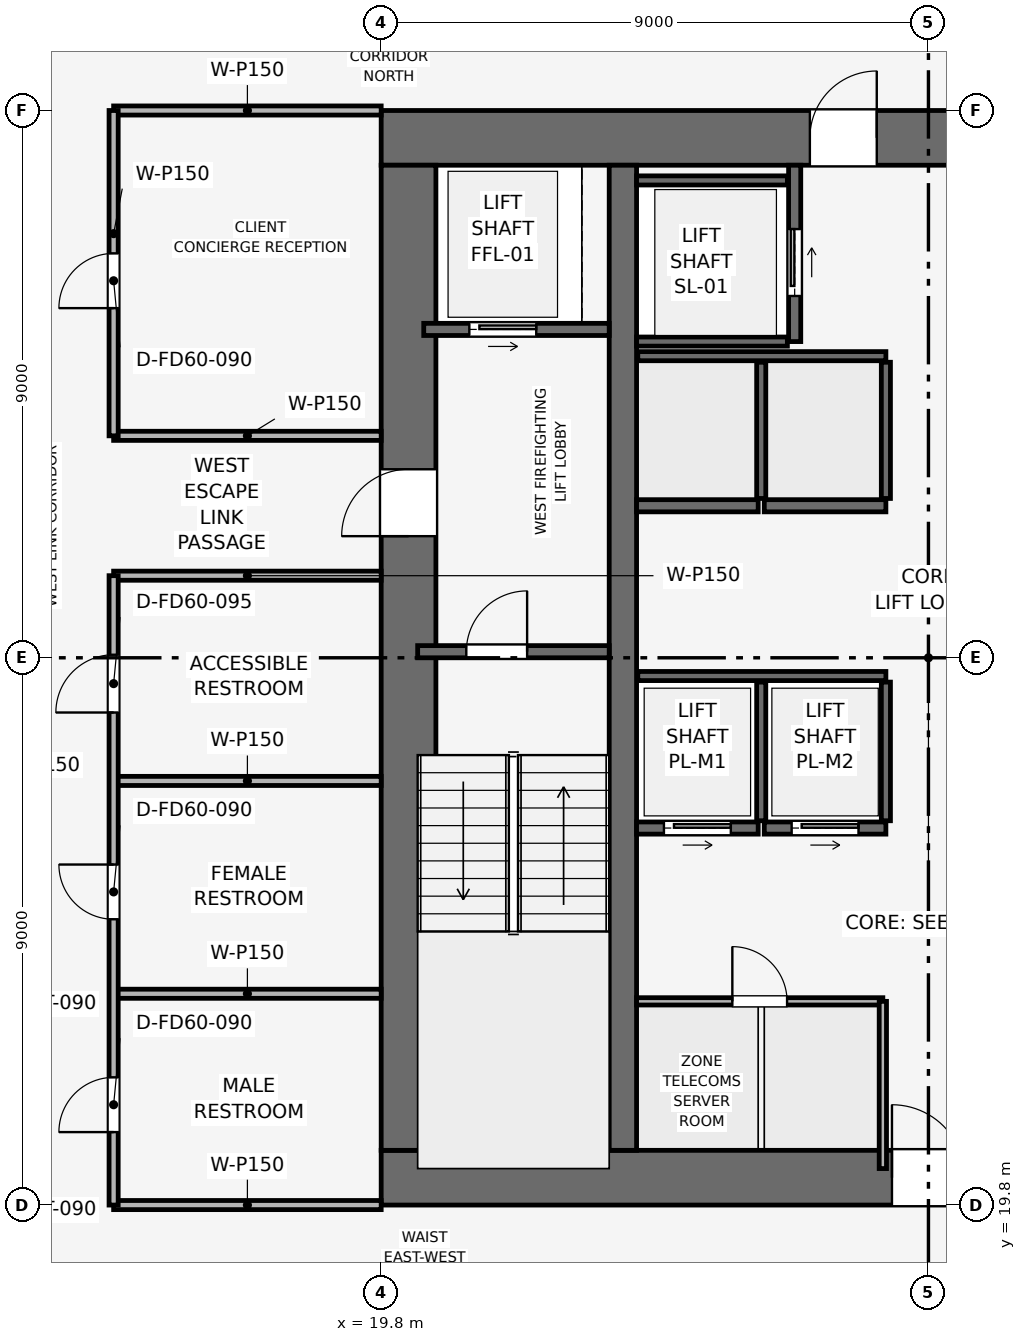
"""IFC4 building model, lengths in metres.
Left out: names, types, materials, properties, quantities, classifications, styles, units other than length and angle.
Written with IfcOpenShell. Run it as: python <this file> out.ifc"""

import sys

from ifc_helpers import new_model, si_unit, direction, frame, frame_2d, origin, place, context, subcontext, project, spatial, rectangle, extrude, element, fill, save


model = new_model("IFC4")
c1 = context("Model", 3, precision=1e-05, world=origin(), true_north=direction((0.0, 1.0)))
c2 = subcontext(c1, "Body", "Model", "MODEL_VIEW")
j1 = project(units=[si_unit("LENGTHUNIT", "METRE"), si_unit("PLANEANGLEUNIT", "RADIAN")], contexts=[c1])
p1 = place(None, origin())
s1 = spatial("IfcSite", under=j1, at=p1, CompositionType="ELEMENT")
p2 = place(p1, origin())
s2 = spatial("IfcBuilding", under=s1, at=p2, CompositionType="ELEMENT")
p3 = place(p2, frame((0.0, 0.0, 172.05)))
s3 = spatial("IfcBuildingStorey", under=s2, at=p3, CompositionType="ELEMENT", Elevation=172.05)
p4 = place(p3, frame((19.8, 20.25, 0.0), z_axis=(0.0, 0.0, 1.0), x_axis=(1.0, 0.0, 0.0)))
e1 = element("IfcWall", 1, at=p4, inside=s3, PredefinedType="SHEAR", context=c2, shape_type="SweptSolid", body=[
    extrude(rectangle(XDim=18.0, YDim=0.9, at=frame_2d((9.0, 0.0))), origin(), (0.0, 0.0, 1.0), 3.75),
])
p5 = place(p4, frame((8.4, 0.0, 0.0)))
e2 = element("IfcOpeningElement", 2, at=p5, cuts=e1, PredefinedType="OPENING", context=c2, shape_type="SweptSolid", body=[
    extrude(rectangle(XDim=1.2, YDim=2.2, at=frame_2d((0.6, 1.1))), frame((0.0, 0.46, 0.0), z_axis=(0.0, -1.0, 0.0), x_axis=(1.0, 0.0, 0.0)), (0.0, 0.0, 1.0), 0.92),
])
p6 = place(p3, frame((19.8, 37.35, 0.0), z_axis=(0.0, 0.0, 1.0), x_axis=(1.0, 0.0, 0.0)))
e3 = element("IfcWall", 3, at=p6, inside=s3, PredefinedType="SHEAR", context=c2, shape_type="SweptSolid", body=[
    extrude(rectangle(XDim=18.0, YDim=0.9, at=frame_2d((9.0, 0.0))), origin(), (0.0, 0.0, 1.0), 3.75),
])
p7 = place(p6, frame((7.05, 0.0, 0.0)))
e4 = element("IfcOpeningElement", 4, at=p7, cuts=e3, PredefinedType="OPENING", context=c2, shape_type="SweptSolid", body=[
    extrude(rectangle(XDim=1.1, YDim=2.15, at=frame_2d((0.55, 1.075))), frame((0.0, 0.46, 0.0), z_axis=(0.0, -1.0, 0.0), x_axis=(1.0, 0.0, 0.0)), (0.0, 0.0, 1.0), 0.92),
])
p8 = place(p3, frame((20.25, 20.7, 0.0), z_axis=(0.0, 0.0, 1.0), x_axis=(0.0, 1.0, 0.0)))
e5 = element("IfcWall", 5, at=p8, inside=s3, PredefinedType="SHEAR", context=c2, shape_type="SweptSolid", body=[
    extrude(rectangle(XDim=16.2, YDim=0.9, at=frame_2d((8.1, 0.0))), origin(), (0.0, 0.0, 1.0), 3.75),
])
p9 = place(p8, frame((10.1, 0.0, 0.0)))
e6 = element("IfcOpeningElement", 6, at=p9, cuts=e5, PredefinedType="OPENING", context=c2, shape_type="SweptSolid", body=[
    extrude(rectangle(XDim=1.1, YDim=2.15, at=frame_2d((0.55, 1.075))), frame((0.0, 0.46, 0.0), z_axis=(0.0, -1.0, 0.0), x_axis=(1.0, 0.0, 0.0)), (0.0, 0.0, 1.0), 0.92),
])
p10 = place(p3, frame((23.775, 20.7, 0.0), z_axis=(0.0, 0.0, 1.0), x_axis=(0.0, 1.0, 0.0)))
e7 = element("IfcWall", 7, at=p10, inside=s3, PredefinedType="SHEAR", context=c2, shape_type="SweptSolid", body=[
    extrude(rectangle(XDim=16.2, YDim=0.45, at=frame_2d((8.1, 0.0))), origin(), (0.0, 0.0, 1.0), 3.75),
])
p11 = place(p3, frame((20.4, 28.9, 0.0), z_axis=(0.0, 0.0, 1.0), x_axis=(1.0, 0.0, 0.0)))
e8 = element("IfcWall", 8, at=p11, inside=s3, PredefinedType="SHEAR", context=c2, shape_type="SweptSolid", body=[
    extrude(rectangle(XDim=3.15, YDim=0.2, at=frame_2d((1.575, 0.0))), origin(), (0.0, 0.0, 1.0), 3.495),
])
p12 = place(p11, frame((0.8, 0.0, 0.0)))
e9 = element("IfcOpeningElement", 9, at=p12, cuts=e8, PredefinedType="OPENING", context=c2, shape_type="SweptSolid", body=[
    extrude(rectangle(XDim=1.0, YDim=2.1, at=frame_2d((0.5, 1.05))), frame((0.0, 0.11, 0.0), z_axis=(0.0, -1.0, 0.0), x_axis=(1.0, 0.0, 0.0)), (0.0, 0.0, 1.0), 0.22),
])
p13 = place(p3, frame((20.5, 34.2, 0.0), z_axis=(0.0, 0.0, 1.0), x_axis=(1.0, 0.0, 0.0)))
e10 = element("IfcWall", 10, at=p13, inside=s3, PredefinedType="SHEAR", context=c2, shape_type="SweptSolid", body=[
    extrude(rectangle(XDim=3.05, YDim=0.2, at=frame_2d((1.525, 0.0))), origin(), (0.0, 0.0, 1.0), 3.495),
])
p14 = place(p13, frame((0.75, 0.0, 0.0)))
e11 = element("IfcOpeningElement", 11, at=p14, cuts=e10, PredefinedType="OPENING", context=c2, shape_type="SweptSolid", body=[
    extrude(rectangle(XDim=1.1, YDim=2.15, at=frame_2d((0.55, 1.075))), frame((0.0, 0.11, 0.0), z_axis=(0.0, -1.0, 0.0), x_axis=(1.0, 0.0, 0.0)), (0.0, 0.0, 1.0), 0.22),
])
p15 = place(p3, frame((26.6, 34.0, 0.0), z_axis=(0.0, 0.0, 1.0), x_axis=(0.0, 1.0, 0.0)))
e12 = element("IfcWall", 12, at=p15, inside=s3, PredefinedType="SHEAR", context=c2, shape_type="SweptSolid", body=[
    extrude(rectangle(XDim=2.9, YDim=0.2, at=frame_2d((1.45, 0.0))), origin(), (0.0, 0.0, 1.0), 3.495),
])
p16 = place(p15, frame((0.75, 0.0, 0.0)))
e13 = element("IfcOpeningElement", 13, at=p16, cuts=e12, PredefinedType="OPENING", context=c2, shape_type="SweptSolid", body=[
    extrude(rectangle(XDim=1.1, YDim=2.15, at=frame_2d((0.55, 1.075))), frame((0.0, 0.11, 0.0), z_axis=(0.0, -1.0, 0.0), x_axis=(1.0, 0.0, 0.0)), (0.0, 0.0, 1.0), 0.22),
])
for number, where, z_axis, x_axis in (
    (14, (24.0, 34.0, 0.0), (0.0, 0.0, 1.0), (1.0, 0.0, 0.0)),
    (15, (24.0, 36.65, 0.0), (0.0, 0.0, 1.0), (1.0, 0.0, 0.0)),
):
    element("IfcWall", number, at=place(p3, frame(where, z_axis=z_axis, x_axis=x_axis)), inside=s3, PredefinedType="SHEAR", context=c2, shape_type="SweptSolid", body=[
        extrude(rectangle(XDim=2.48, YDim=0.15, at=frame_2d((1.24, 0.0))), origin(), (0.0, 0.0, 1.0), 3.495),
    ])
p17 = place(p3, frame((24.0, 26.0, 0.0), z_axis=(0.0, 0.0, 1.0), x_axis=(1.0, 0.0, 0.0)))
e16 = element("IfcWall", 16, at=p17, inside=s3, PredefinedType="SHEAR", context=c2, shape_type="SweptSolid", body=[
    extrude(rectangle(XDim=2.0, YDim=0.2, at=frame_2d((1.0, 0.0))), origin(), (0.0, 0.0, 1.0), 3.495),
])
p18 = place(p17, frame((0.45, 0.0, 0.0)))
e17 = element("IfcOpeningElement", 17, at=p18, cuts=e16, PredefinedType="OPENING", context=c2, shape_type="SweptSolid", body=[
    extrude(rectangle(XDim=1.1, YDim=2.15, at=frame_2d((0.55, 1.075))), frame((0.0, 0.11, 0.0), z_axis=(0.0, -1.0, 0.0), x_axis=(1.0, 0.0, 0.0)), (0.0, 0.0, 1.0), 0.22),
])
p19 = place(p3, frame((26.1, 26.0, 0.0), z_axis=(0.0, 0.0, 1.0), x_axis=(1.0, 0.0, 0.0)))
e18 = element("IfcWall", 18, at=p19, inside=s3, PredefinedType="SHEAR", context=c2, shape_type="SweptSolid", body=[
    extrude(rectangle(XDim=2.0, YDim=0.2, at=frame_2d((1.0, 0.0))), origin(), (0.0, 0.0, 1.0), 3.495),
])
p20 = place(p19, frame((0.45, 0.0, 0.0)))
e19 = element("IfcOpeningElement", 19, at=p20, cuts=e18, PredefinedType="OPENING", context=c2, shape_type="SweptSolid", body=[
    extrude(rectangle(XDim=1.1, YDim=2.15, at=frame_2d((0.55, 1.075))), frame((0.0, 0.11, 0.0), z_axis=(0.0, -1.0, 0.0), x_axis=(1.0, 0.0, 0.0)), (0.0, 0.0, 1.0), 0.22),
])
for number, where, z_axis, x_axis in (
    (20, (24.0, 31.3, 0.0), (0.0, 0.0, 1.0), (1.0, 0.0, 0.0)),
    (21, (26.1, 31.3, 0.0), (0.0, 0.0, 1.0), (1.0, 0.0, 0.0)),
):
    element("IfcWall", number, at=place(p3, frame(where, z_axis=z_axis, x_axis=x_axis)), inside=s3, PredefinedType="SHEAR", context=c2, shape_type="SweptSolid", body=[
        extrude(rectangle(XDim=2.0, YDim=0.2, at=frame_2d((1.0, 0.0))), origin(), (0.0, 0.0, 1.0), 3.495),
    ])
p21 = place(p3, frame((24.02, 28.5, 0.0), z_axis=(0.0, 0.0, 1.0), x_axis=(1.0, 0.0, 0.0)))
e22 = element("IfcWall", 22, at=p21, inside=s3, PredefinedType="SHEAR", context=c2, shape_type="SweptSolid", body=[
    extrude(rectangle(XDim=4.08, YDim=0.15, at=frame_2d((2.04, 0.0))), origin(), (0.0, 0.0, 1.0), 3.495),
])
for number, where, z_axis, x_axis in (
    (23, (26.05, 26.12, 0.0), (0.0, 0.0, 1.0), (0.0, 1.0, 0.0)),
    (24, (28.1, 26.12, 0.0), (0.0, 0.0, 1.0), (0.0, 1.0, 0.0)),
):
    element("IfcWall", number, at=place(p3, frame(where, z_axis=z_axis, x_axis=x_axis)), inside=s3, PredefinedType="SHEAR", context=c2, shape_type="SweptSolid", body=[
        extrude(rectangle(XDim=2.28, YDim=0.15, at=frame_2d((1.14, 0.0))), origin(), (0.0, 0.0, 1.0), 3.495),
    ])
p22 = place(p3, frame((24.02, 33.76, 0.0), z_axis=(0.0, 0.0, 1.0), x_axis=(1.0, 0.0, 0.0)))
e25 = element("IfcWall", 25, at=p22, inside=s3, PredefinedType="SHEAR", context=c2, shape_type="SweptSolid", body=[
    extrude(rectangle(XDim=4.08, YDim=0.15, at=frame_2d((2.04, 0.0))), origin(), (0.0, 0.0, 1.0), 3.495),
])
for number, where, z_axis, x_axis in (
    (26, (26.05, 31.42, 0.0), (0.0, 0.0, 1.0), (0.0, 1.0, 0.0)),
    (27, (28.1, 31.42, 0.0), (0.0, 0.0, 1.0), (0.0, 1.0, 0.0)),
):
    element("IfcWall", number, at=place(p3, frame(where, z_axis=z_axis, x_axis=x_axis)), inside=s3, PredefinedType="SHEAR", context=c2, shape_type="SweptSolid", body=[
        extrude(rectangle(XDim=2.24, YDim=0.15, at=frame_2d((1.12, 0.0))), origin(), (0.0, 0.0, 1.0), 3.495),
    ])
p23 = place(p3, frame((24.0, 23.15, 0.0), z_axis=(0.0, 0.0, 1.0), x_axis=(1.0, 0.0, 0.0)))
e28 = element("IfcWall", 28, at=p23, inside=s3, PredefinedType="PARTITIONING", context=c2, shape_type="SweptSolid", body=[
    extrude(rectangle(XDim=4.05, YDim=0.12, at=frame_2d((2.025, 0.0))), origin(), (0.0, 0.0, 1.0), 3.495),
])
p24 = place(p23, frame((1.575, 0.0, 0.0)))
e29 = element("IfcOpeningElement", 29, at=p24, cuts=e28, PredefinedType="OPENING", context=c2, shape_type="SweptSolid", body=[
    extrude(rectangle(XDim=0.9, YDim=2.1, at=frame_2d((0.45, 1.05))), frame((0.0, 0.07, 0.0), z_axis=(0.0, -1.0, 0.0), x_axis=(1.0, 0.0, 0.0)), (0.0, 0.0, 1.0), 0.14),
])
p25 = place(p3, frame((28.05, 20.4, 0.0), z_axis=(0.0, 0.0, 1.0), x_axis=(0.0, 1.0, 0.0)))
e30 = element("IfcWall", 30, at=p25, inside=s3, PredefinedType="PARTITIONING", context=c2, shape_type="SweptSolid", body=[
    extrude(rectangle(XDim=2.75, YDim=0.12, at=frame_2d((1.375, 0.0))), origin(), (0.0, 0.0, 1.0), 3.495),
])
p26 = place(p3, frame((15.4, 19.8, 0.0), z_axis=(0.0, 0.0, 1.0), x_axis=(1.0, 0.0, 0.0)))
e31 = element("IfcWall", 31, at=p26, inside=s3, PredefinedType="PARTITIONING", context=c2, shape_type="SweptSolid", body=[
    extrude(rectangle(XDim=4.4, YDim=0.15, at=frame_2d((2.2, 0.0))), origin(), (0.0, 0.0, 1.0), 3.03),
])
for number, where, z_axis, x_axis in (
    (32, (15.4, 23.275, 0.0), (0.0, 0.0, 1.0), (1.0, 0.0, 0.0)),
    (33, (15.4, 26.775, 0.0), (0.0, 0.0, 1.0), (1.0, 0.0, 0.0)),
    (34, (15.4, 30.15, 0.0), (0.0, 0.0, 1.0), (1.0, 0.0, 0.0)),
    (35, (15.4, 32.45, 0.0), (0.0, 0.0, 1.0), (1.0, 0.0, 0.0)),
):
    element("IfcWall", number, at=place(p3, frame(where, z_axis=z_axis, x_axis=x_axis)), inside=s3, PredefinedType="PARTITIONING", context=c2, shape_type="SweptSolid", body=[
        extrude(rectangle(XDim=4.4, YDim=0.15, at=frame_2d((2.2, 0.0))), origin(), (0.0, 0.0, 1.0), 3.495),
    ])
p27 = place(p3, frame((15.4, 37.8, 0.0), z_axis=(0.0, 0.0, 1.0), x_axis=(1.0, 0.0, 0.0)))
e36 = element("IfcWall", 36, at=p27, inside=s3, PredefinedType="PARTITIONING", context=c2, shape_type="SweptSolid", body=[
    extrude(rectangle(XDim=4.4, YDim=0.15, at=frame_2d((2.2, 0.0))), origin(), (0.0, 0.0, 1.0), 3.03),
])
p28 = place(p3, frame((15.4, 19.8, 0.0), z_axis=(0.0, 0.0, 1.0), x_axis=(0.0, 1.0, 0.0)))
e37 = element("IfcWall", 37, at=p28, inside=s3, PredefinedType="PARTITIONING", context=c2, shape_type="SweptSolid", body=[
    extrude(rectangle(XDim=10.35, YDim=0.15, at=frame_2d((5.175, 0.0))), origin(), (0.0, 0.0, 1.0), 3.03),
])
p29 = place(p28, frame((1.2, 0.0, 0.0)))
e38 = element("IfcOpeningElement", 38, at=p29, cuts=e37, PredefinedType="OPENING", context=c2, shape_type="SweptSolid", body=[
    extrude(rectangle(XDim=0.9, YDim=2.1, at=frame_2d((0.45, 1.05))), frame((0.0, 0.085, 0.0), z_axis=(0.0, -1.0, 0.0), x_axis=(1.0, 0.0, 0.0)), (0.0, 0.0, 1.0), 0.17),
])
p30 = place(p28, frame((4.7, 0.0, 0.0)))
e39 = element("IfcOpeningElement", 39, at=p30, cuts=e37, PredefinedType="OPENING", context=c2, shape_type="SweptSolid", body=[
    extrude(rectangle(XDim=0.9, YDim=2.1, at=frame_2d((0.45, 1.05))), frame((0.0, 0.085, 0.0), z_axis=(0.0, -1.0, 0.0), x_axis=(1.0, 0.0, 0.0)), (0.0, 0.0, 1.0), 0.17),
])
p31 = place(p28, frame((8.1, 0.0, 0.0)))
e40 = element("IfcOpeningElement", 40, at=p31, cuts=e37, PredefinedType="OPENING", context=c2, shape_type="SweptSolid", body=[
    extrude(rectangle(XDim=0.95, YDim=2.1, at=frame_2d((0.475, 1.05))), frame((0.0, 0.085, 0.0), z_axis=(0.0, -1.0, 0.0), x_axis=(1.0, 0.0, 0.0)), (0.0, 0.0, 1.0), 0.17),
])
p32 = place(p3, frame((15.4, 32.45, 0.0), z_axis=(0.0, 0.0, 1.0), x_axis=(0.0, 1.0, 0.0)))
e41 = element("IfcWall", 41, at=p32, inside=s3, PredefinedType="PARTITIONING", context=c2, shape_type="SweptSolid", body=[
    extrude(rectangle(XDim=5.35, YDim=0.15, at=frame_2d((2.675, 0.0))), origin(), (0.0, 0.0, 1.0), 3.03),
])
p33 = place(p32, frame((2.1, 0.0, 0.0)))
e42 = element("IfcOpeningElement", 42, at=p33, cuts=e41, PredefinedType="OPENING", context=c2, shape_type="SweptSolid", body=[
    extrude(rectangle(XDim=0.9, YDim=2.1, at=frame_2d((0.45, 1.05))), frame((0.0, 0.085, 0.0), z_axis=(0.0, -1.0, 0.0), x_axis=(1.0, 0.0, 0.0)), (0.0, 0.0, 1.0), 0.17),
])
p34 = place(p12, origin())
e43 = element("IfcDoor", 43, at=p34, inside=s3, OperationType="SINGLE_SWING_RIGHT", PredefinedType="DOOR", context=c2, shape_type="SweptSolid", body=[
    extrude(rectangle(XDim=1.0, YDim=2.1, at=frame_2d((0.5, 1.05))), frame((0.0, 0.025, 0.0), z_axis=(0.0, -1.0, 0.0), x_axis=(1.0, 0.0, 0.0)), (0.0, 0.0, 1.0), 0.05),
])
fill(e9, e43)
p35 = place(p14, origin())
e44 = element("IfcDoor", 44, at=p35, inside=s3, OperationType="SLIDING_TO_RIGHT", PredefinedType="DOOR", context=c2, shape_type="SweptSolid", body=[
    extrude(rectangle(XDim=1.1, YDim=2.15, at=frame_2d((0.55, 1.075))), frame((0.0, 0.025, 0.0), z_axis=(0.0, -1.0, 0.0), x_axis=(1.0, 0.0, 0.0)), (0.0, 0.0, 1.0), 0.05),
])
fill(e11, e44)
p36 = place(p16, origin())
e45 = element("IfcDoor", 45, at=p36, inside=s3, OperationType="SLIDING_TO_RIGHT", PredefinedType="DOOR", context=c2, shape_type="SweptSolid", body=[
    extrude(rectangle(XDim=1.1, YDim=2.15, at=frame_2d((0.55, 1.075))), frame((0.0, 0.025, 0.0), z_axis=(0.0, -1.0, 0.0), x_axis=(1.0, 0.0, 0.0)), (0.0, 0.0, 1.0), 0.05),
])
fill(e13, e45)
p37 = place(p18, origin())
e46 = element("IfcDoor", 46, at=p37, inside=s3, OperationType="SLIDING_TO_RIGHT", PredefinedType="DOOR", context=c2, shape_type="SweptSolid", body=[
    extrude(rectangle(XDim=1.1, YDim=2.15, at=frame_2d((0.55, 1.075))), frame((0.0, 0.025, 0.0), z_axis=(0.0, -1.0, 0.0), x_axis=(1.0, 0.0, 0.0)), (0.0, 0.0, 1.0), 0.05),
])
fill(e17, e46)
p38 = place(p20, origin())
e47 = element("IfcDoor", 47, at=p38, inside=s3, OperationType="SLIDING_TO_RIGHT", PredefinedType="DOOR", context=c2, shape_type="SweptSolid", body=[
    extrude(rectangle(XDim=1.1, YDim=2.15, at=frame_2d((0.55, 1.075))), frame((0.0, 0.025, 0.0), z_axis=(0.0, -1.0, 0.0), x_axis=(1.0, 0.0, 0.0)), (0.0, 0.0, 1.0), 0.05),
])
fill(e19, e47)
p39 = place(p24, origin())
e48 = element("IfcDoor", 48, at=p39, inside=s3, OperationType="SINGLE_SWING_LEFT", PredefinedType="DOOR", context=c2, shape_type="SweptSolid", body=[
    extrude(rectangle(XDim=0.9, YDim=2.1, at=frame_2d((0.45, 1.05))), frame((0.0, 0.025, 0.0), z_axis=(0.0, -1.0, 0.0), x_axis=(1.0, 0.0, 0.0)), (0.0, 0.0, 1.0), 0.05),
])
fill(e29, e48)
p40 = place(p29, origin())
e49 = element("IfcDoor", 49, at=p40, inside=s3, OperationType="SINGLE_SWING_LEFT", PredefinedType="DOOR", context=c2, shape_type="SweptSolid", body=[
    extrude(rectangle(XDim=0.9, YDim=2.1, at=frame_2d((0.45, 1.05))), frame((0.0, 0.025, 0.0), z_axis=(0.0, -1.0, 0.0), x_axis=(1.0, 0.0, 0.0)), (0.0, 0.0, 1.0), 0.05),
])
fill(e38, e49)
p41 = place(p30, origin())
e50 = element("IfcDoor", 50, at=p41, inside=s3, OperationType="SINGLE_SWING_RIGHT", PredefinedType="DOOR", context=c2, shape_type="SweptSolid", body=[
    extrude(rectangle(XDim=0.9, YDim=2.1, at=frame_2d((0.45, 1.05))), frame((0.0, 0.025, 0.0), z_axis=(0.0, -1.0, 0.0), x_axis=(1.0, 0.0, 0.0)), (0.0, 0.0, 1.0), 0.05),
])
fill(e39, e50)
p42 = place(p31, origin())
e51 = element("IfcDoor", 51, at=p42, inside=s3, OperationType="SINGLE_SWING_LEFT", PredefinedType="DOOR", context=c2, shape_type="SweptSolid", body=[
    extrude(rectangle(XDim=0.95, YDim=2.1, at=frame_2d((0.475, 1.05))), frame((0.0, 0.025, 0.0), z_axis=(0.0, -1.0, 0.0), x_axis=(1.0, 0.0, 0.0)), (0.0, 0.0, 1.0), 0.05),
])
fill(e40, e51)
p43 = place(p33, origin())
e52 = element("IfcDoor", 52, at=p43, inside=s3, OperationType="SINGLE_SWING_LEFT", PredefinedType="DOOR", context=c2, shape_type="SweptSolid", body=[
    extrude(rectangle(XDim=0.9, YDim=2.1, at=frame_2d((0.45, 1.05))), frame((0.0, 0.025, 0.0), z_axis=(0.0, -1.0, 0.0), x_axis=(1.0, 0.0, 0.0)), (0.0, 0.0, 1.0), 0.05),
])
fill(e42, e52)
p44 = place(p9, origin())
e53 = element("IfcDoor", 53, at=p44, inside=s3, OperationType="SINGLE_SWING_LEFT", PredefinedType="DOOR", context=c2, shape_type="SweptSolid", body=[
    extrude(rectangle(XDim=1.1, YDim=2.15, at=frame_2d((0.55, 1.075))), frame((0.0, 0.025, 0.0), z_axis=(0.0, -1.0, 0.0), x_axis=(1.0, 0.0, 0.0)), (0.0, 0.0, 1.0), 0.05),
])
fill(e6, e53)
p45 = place(p5, origin())
e54 = element("IfcDoor", 54, at=p45, inside=s3, OperationType="SINGLE_SWING_LEFT", PredefinedType="DOOR", context=c2, shape_type="SweptSolid", body=[
    extrude(rectangle(XDim=1.2, YDim=2.2, at=frame_2d((0.6, 1.1))), frame((0.0, 0.025, 0.0), z_axis=(0.0, -1.0, 0.0), x_axis=(1.0, 0.0, 0.0)), (0.0, 0.0, 1.0), 0.05),
])
fill(e2, e54)
p46 = place(p7, origin())
e55 = element("IfcDoor", 55, at=p46, inside=s3, OperationType="SINGLE_SWING_RIGHT", PredefinedType="DOOR", context=c2, shape_type="SweptSolid", body=[
    extrude(rectangle(XDim=1.1, YDim=2.15, at=frame_2d((0.55, 1.075))), frame((0.0, 0.025, 0.0), z_axis=(0.0, -1.0, 0.0), x_axis=(1.0, 0.0, 0.0)), (0.0, 0.0, 1.0), 0.05),
])
fill(e4, e55)
save(model, sys.argv[1])
